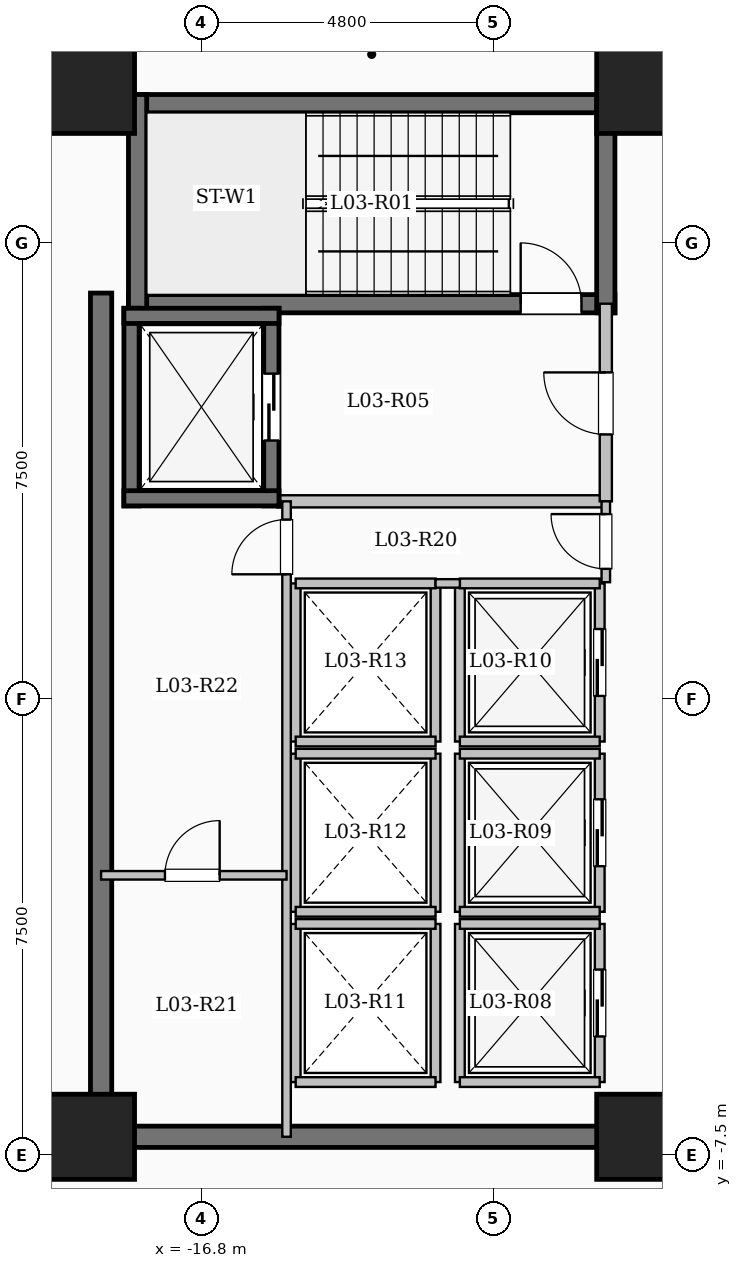
"""IFC4 building model, lengths in metres.
Left out: names, types, materials, properties, quantities, classifications, styles, units other than length and angle.
Written with IfcOpenShell. Run it as: python <this file> out.ifc"""

import sys

from ifc_helpers import new_model, si_unit, direction, frame, frame_2d, origin, origin_2d, place, context, subcontext, project, spatial, rectangle, extrude, element, fill, save


model = new_model("IFC4")
c1 = context("Model", 3, precision=1e-05, world=origin(), true_north=direction((0.0, 1.0)))
c2 = subcontext(c1, "Body", "Model", "MODEL_VIEW")
j1 = project(units=[si_unit("LENGTHUNIT", "METRE"), si_unit("PLANEANGLEUNIT", "RADIAN")], contexts=[c1])
p1 = place(None, origin())
s1 = spatial("IfcSite", under=j1, at=p1, CompositionType="ELEMENT")
p2 = place(p1, origin())
s2 = spatial("IfcBuilding", under=s1, at=p2, CompositionType="ELEMENT")
p3 = place(p2, frame((0.0, 0.0, 14.4)))
s3 = spatial("IfcBuildingStorey", under=s2, at=p3, CompositionType="ELEMENT", Elevation=14.4)
for number, where, z_axis, x_axis in (
    (1, (-9.6, -7.2, 0.0), (0.0, 0.0, 1.0), (1.0, 0.0, 0.0)),
    (2, (-9.6, 10.0, 0.0), (0.0, 0.0, 1.0), (1.0, 0.0, 0.0)),
    (3, (-18.6, -7.2, 0.0), (0.0, 0.0, 1.0), (1.0, 0.0, 0.0)),
    (4, (-18.6, 10.0, 0.0), (0.0, 0.0, 1.0), (1.0, 0.0, 0.0)),
):
    element("IfcColumn", number, at=place(p3, frame(where, z_axis=z_axis, x_axis=x_axis)), inside=s3, PredefinedType="COLUMN", context=c2, shape_type="SweptSolid", body=[
        extrude(rectangle(XDim=1.4, YDim=1.4, at=origin_2d()), origin(), (0.0, 0.0, 1.0), 4.5),
    ])
p4 = place(p3, frame((-18.0, 9.79, 0.0), z_axis=(0.0, 0.0, 1.0), x_axis=(1.0, 0.0, 0.0)))
e5 = element("IfcWall", 5, at=p4, inside=s3, PredefinedType="SHEAR", context=c2, shape_type="SweptSolid", body=[
    extrude(rectangle(XDim=8.0, YDim=0.3, at=frame_2d((4.0, 0.0))), origin(), (0.0, 0.0, 1.0), 4.5),
])
p5 = place(p3, frame((-18.0, 6.5, 0.0), z_axis=(0.0, 0.0, 1.0), x_axis=(1.0, 0.0, 0.0)))
e6 = element("IfcWall", 6, at=p5, inside=s3, PredefinedType="SHEAR", context=c2, shape_type="SweptSolid", body=[
    extrude(rectangle(XDim=8.0, YDim=0.3, at=frame_2d((4.0, 0.0))), origin(), (0.0, 0.0, 1.0), 4.5),
])
p6 = place(p5, frame((6.45, 0.0, 0.0)))
e7 = element("IfcOpeningElement", 7, at=p6, cuts=e6, PredefinedType="OPENING", context=c2, shape_type="SweptSolid", body=[
    extrude(rectangle(XDim=1.0, YDim=2.15, at=frame_2d((0.5, 1.075))), frame((0.0, 0.16, 0.0), z_axis=(0.0, -1.0, 0.0), x_axis=(1.0, 0.0, 0.0)), (0.0, 0.0, 1.0), 0.32),
])
for number, where, z_axis, x_axis in (
    (8, (-17.85, 6.35, 0.0), (0.0, 0.0, 1.0), (0.0, 1.0, 0.0)),
    (9, (-10.15, 6.35, 0.0), (0.0, 0.0, 1.0), (0.0, 1.0, 0.0)),
):
    element("IfcWall", number, at=place(p3, frame(where, z_axis=z_axis, x_axis=x_axis)), inside=s3, PredefinedType="SHEAR", context=c2, shape_type="SweptSolid", body=[
        extrude(rectangle(XDim=3.59, YDim=0.3, at=frame_2d((1.795, 0.0))), origin(), (0.0, 0.0, 1.0), 4.5),
    ])
p7 = place(p3, frame((-15.55, 3.25, 0.0), z_axis=(0.0, 0.0, 1.0), x_axis=(1.0, 0.0, 0.0)))
e10 = element("IfcWall", 10, at=p7, inside=s3, PredefinedType="SOLIDWALL", context=c2, shape_type="SweptSolid", body=[
    extrude(rectangle(XDim=5.4, YDim=0.2, at=frame_2d((2.7, 0.0))), origin(), (0.0, 0.0, 1.0), 4.2),
])
p8 = place(p3, frame((-10.15, 3.25, 0.0), z_axis=(0.0, 0.0, 1.0), x_axis=(0.0, 1.0, 0.0)))
e11 = element("IfcWall", 11, at=p8, inside=s3, PredefinedType="SOLIDWALL", context=c2, shape_type="SweptSolid", body=[
    extrude(rectangle(XDim=3.25, YDim=0.2, at=frame_2d((1.625, 0.0))), origin(), (0.0, 0.0, 1.0), 4.2),
])
p9 = place(p8, frame((1.1, 0.0, 0.0)))
e12 = element("IfcOpeningElement", 12, at=p9, cuts=e11, PredefinedType="OPENING", context=c2, shape_type="SweptSolid", body=[
    extrude(rectangle(XDim=1.02, YDim=2.15, at=frame_2d((0.51, 1.075))), frame((0.0, 0.11, 0.0), z_axis=(0.0, -1.0, 0.0), x_axis=(1.0, 0.0, 0.0)), (0.0, 0.0, 1.0), 0.22),
])
p10 = place(p3, frame((-17.95, 3.175, 0.0), z_axis=(0.0, 0.0, 1.0), x_axis=(0.0, 1.0, 0.0)))
e13 = element("IfcWall", 13, at=p10, inside=s3, PredefinedType="SHEAR", context=c2, shape_type="SweptSolid", body=[
    extrude(rectangle(XDim=3.25, YDim=0.25, at=frame_2d((1.625, 0.0))), origin(), (0.0, 0.0, 1.0), 4.5),
])
p11 = place(p3, frame((-15.65, 3.175, 0.0), z_axis=(0.0, 0.0, 1.0), x_axis=(0.0, 1.0, 0.0)))
e14 = element("IfcWall", 14, at=p11, inside=s3, PredefinedType="SHEAR", context=c2, shape_type="SweptSolid", body=[
    extrude(rectangle(XDim=3.25, YDim=0.25, at=frame_2d((1.625, 0.0))), origin(), (0.0, 0.0, 1.0), 4.5),
])
p12 = place(p11, frame((1.075, 0.0, 0.0)))
e15 = element("IfcOpeningElement", 15, at=p12, cuts=e14, PredefinedType="OPENING", context=c2, shape_type="SweptSolid", body=[
    extrude(rectangle(XDim=1.1, YDim=2.15, at=frame_2d((0.55, 1.075))), frame((0.0, 0.135, 0.0), z_axis=(0.0, -1.0, 0.0), x_axis=(1.0, 0.0, 0.0)), (0.0, 0.0, 1.0), 0.27),
])
for number, where, z_axis, x_axis in (
    (16, (-18.075, 3.3, 0.0), (0.0, 0.0, 1.0), (1.0, 0.0, 0.0)),
    (17, (-18.075, 6.3, 0.0), (0.0, 0.0, 1.0), (1.0, 0.0, 0.0)),
):
    element("IfcWall", number, at=place(p3, frame(where, z_axis=z_axis, x_axis=x_axis)), inside=s3, PredefinedType="SHEAR", context=c2, shape_type="SweptSolid", body=[
        extrude(rectangle(XDim=2.55, YDim=0.25, at=frame_2d((1.275, 0.0))), origin(), (0.0, 0.0, 1.0), 4.5),
    ])
p13 = place(p3, frame((-12.55, -6.3, 0.0), z_axis=(0.0, 0.0, 1.0), x_axis=(0.0, 1.0, 0.0)))
e18 = element("IfcWall", 18, at=p13, inside=s3, PredefinedType="SOLIDWALL", context=c2, shape_type="SweptSolid", body=[
    extrude(rectangle(XDim=2.6, YDim=0.16, at=frame_2d((1.3, 0.0))), origin(), (0.0, 0.0, 1.0), 4.2),
])
p14 = place(p3, frame((-10.25, -6.3, 0.0), z_axis=(0.0, 0.0, 1.0), x_axis=(0.0, 1.0, 0.0)))
e19 = element("IfcWall", 19, at=p14, inside=s3, PredefinedType="SOLIDWALL", context=c2, shape_type="SweptSolid", body=[
    extrude(rectangle(XDim=2.6, YDim=0.16, at=frame_2d((1.3, 0.0))), origin(), (0.0, 0.0, 1.0), 4.2),
])
p15 = place(p14, frame((0.75, 0.0, 0.0)))
e20 = element("IfcOpeningElement", 20, at=p15, cuts=e19, PredefinedType="OPENING", context=c2, shape_type="SweptSolid", body=[
    extrude(rectangle(XDim=1.1, YDim=2.15, at=frame_2d((0.55, 1.075))), frame((0.0, 0.09, 0.0), z_axis=(0.0, -1.0, 0.0), x_axis=(1.0, 0.0, 0.0)), (0.0, 0.0, 1.0), 0.18),
])
for number, where, z_axis, x_axis in (
    (21, (-12.55, -6.3, 0.0), (0.0, 0.0, 1.0), (1.0, 0.0, 0.0)),
    (22, (-12.55, -3.7, 0.0), (0.0, 0.0, 1.0), (1.0, 0.0, 0.0)),
):
    element("IfcWall", number, at=place(p3, frame(where, z_axis=z_axis, x_axis=x_axis)), inside=s3, PredefinedType="SOLIDWALL", context=c2, shape_type="SweptSolid", body=[
        extrude(rectangle(XDim=2.3, YDim=0.16, at=frame_2d((1.15, 0.0))), origin(), (0.0, 0.0, 1.0), 4.2),
    ])
p16 = place(p3, frame((-12.55, -3.5, 0.0), z_axis=(0.0, 0.0, 1.0), x_axis=(0.0, 1.0, 0.0)))
e23 = element("IfcWall", 23, at=p16, inside=s3, PredefinedType="SOLIDWALL", context=c2, shape_type="SweptSolid", body=[
    extrude(rectangle(XDim=2.6, YDim=0.16, at=frame_2d((1.3, 0.0))), origin(), (0.0, 0.0, 1.0), 4.2),
])
p17 = place(p3, frame((-10.25, -3.5, 0.0), z_axis=(0.0, 0.0, 1.0), x_axis=(0.0, 1.0, 0.0)))
e24 = element("IfcWall", 24, at=p17, inside=s3, PredefinedType="SOLIDWALL", context=c2, shape_type="SweptSolid", body=[
    extrude(rectangle(XDim=2.6, YDim=0.16, at=frame_2d((1.3, 0.0))), origin(), (0.0, 0.0, 1.0), 4.2),
])
p18 = place(p17, frame((0.75, 0.0, 0.0)))
e25 = element("IfcOpeningElement", 25, at=p18, cuts=e24, PredefinedType="OPENING", context=c2, shape_type="SweptSolid", body=[
    extrude(rectangle(XDim=1.1, YDim=2.15, at=frame_2d((0.55, 1.075))), frame((0.0, 0.09, 0.0), z_axis=(0.0, -1.0, 0.0), x_axis=(1.0, 0.0, 0.0)), (0.0, 0.0, 1.0), 0.18),
])
for number, where, z_axis, x_axis in (
    (26, (-12.55, -3.5, 0.0), (0.0, 0.0, 1.0), (1.0, 0.0, 0.0)),
    (27, (-12.55, -0.9, 0.0), (0.0, 0.0, 1.0), (1.0, 0.0, 0.0)),
):
    element("IfcWall", number, at=place(p3, frame(where, z_axis=z_axis, x_axis=x_axis)), inside=s3, PredefinedType="SOLIDWALL", context=c2, shape_type="SweptSolid", body=[
        extrude(rectangle(XDim=2.3, YDim=0.16, at=frame_2d((1.15, 0.0))), origin(), (0.0, 0.0, 1.0), 4.2),
    ])
p19 = place(p3, frame((-12.55, -0.7, 0.0), z_axis=(0.0, 0.0, 1.0), x_axis=(0.0, 1.0, 0.0)))
e28 = element("IfcWall", 28, at=p19, inside=s3, PredefinedType="SOLIDWALL", context=c2, shape_type="SweptSolid", body=[
    extrude(rectangle(XDim=2.6, YDim=0.16, at=frame_2d((1.3, 0.0))), origin(), (0.0, 0.0, 1.0), 4.2),
])
p20 = place(p3, frame((-10.25, -0.7, 0.0), z_axis=(0.0, 0.0, 1.0), x_axis=(0.0, 1.0, 0.0)))
e29 = element("IfcWall", 29, at=p20, inside=s3, PredefinedType="SOLIDWALL", context=c2, shape_type="SweptSolid", body=[
    extrude(rectangle(XDim=2.6, YDim=0.16, at=frame_2d((1.3, 0.0))), origin(), (0.0, 0.0, 1.0), 4.2),
])
p21 = place(p20, frame((0.75, 0.0, 0.0)))
e30 = element("IfcOpeningElement", 30, at=p21, cuts=e29, PredefinedType="OPENING", context=c2, shape_type="SweptSolid", body=[
    extrude(rectangle(XDim=1.1, YDim=2.15, at=frame_2d((0.55, 1.075))), frame((0.0, 0.09, 0.0), z_axis=(0.0, -1.0, 0.0), x_axis=(1.0, 0.0, 0.0)), (0.0, 0.0, 1.0), 0.18),
])
for number, where, z_axis, x_axis in (
    (31, (-12.55, -0.7, 0.0), (0.0, 0.0, 1.0), (1.0, 0.0, 0.0)),
    (32, (-12.55, 1.9, 0.0), (0.0, 0.0, 1.0), (1.0, 0.0, 0.0)),
):
    element("IfcWall", number, at=place(p3, frame(where, z_axis=z_axis, x_axis=x_axis)), inside=s3, PredefinedType="SOLIDWALL", context=c2, shape_type="SweptSolid", body=[
        extrude(rectangle(XDim=2.3, YDim=0.16, at=frame_2d((1.15, 0.0))), origin(), (0.0, 0.0, 1.0), 4.2),
    ])
for number, where, z_axis, x_axis in (
    (33, (-15.25, -6.3, 0.0), (0.0, 0.0, 1.0), (0.0, 1.0, 0.0)),
    (34, (-12.95, -6.3, 0.0), (0.0, 0.0, 1.0), (0.0, 1.0, 0.0)),
):
    element("IfcWall", number, at=place(p3, frame(where, z_axis=z_axis, x_axis=x_axis)), inside=s3, PredefinedType="SOLIDWALL", context=c2, shape_type="SweptSolid", body=[
        extrude(rectangle(XDim=2.6, YDim=0.16, at=frame_2d((1.3, 0.0))), origin(), (0.0, 0.0, 1.0), 4.2),
    ])
for number, where, z_axis, x_axis in (
    (35, (-15.25, -6.3, 0.0), (0.0, 0.0, 1.0), (1.0, 0.0, 0.0)),
    (36, (-15.25, -3.7, 0.0), (0.0, 0.0, 1.0), (1.0, 0.0, 0.0)),
):
    element("IfcWall", number, at=place(p3, frame(where, z_axis=z_axis, x_axis=x_axis)), inside=s3, PredefinedType="SOLIDWALL", context=c2, shape_type="SweptSolid", body=[
        extrude(rectangle(XDim=2.3, YDim=0.16, at=frame_2d((1.15, 0.0))), origin(), (0.0, 0.0, 1.0), 4.2),
    ])
for number, where, z_axis, x_axis in (
    (37, (-15.25, -3.5, 0.0), (0.0, 0.0, 1.0), (0.0, 1.0, 0.0)),
    (38, (-12.95, -3.5, 0.0), (0.0, 0.0, 1.0), (0.0, 1.0, 0.0)),
):
    element("IfcWall", number, at=place(p3, frame(where, z_axis=z_axis, x_axis=x_axis)), inside=s3, PredefinedType="SOLIDWALL", context=c2, shape_type="SweptSolid", body=[
        extrude(rectangle(XDim=2.6, YDim=0.16, at=frame_2d((1.3, 0.0))), origin(), (0.0, 0.0, 1.0), 4.2),
    ])
for number, where, z_axis, x_axis in (
    (39, (-15.25, -3.5, 0.0), (0.0, 0.0, 1.0), (1.0, 0.0, 0.0)),
    (40, (-15.25, -0.9, 0.0), (0.0, 0.0, 1.0), (1.0, 0.0, 0.0)),
):
    element("IfcWall", number, at=place(p3, frame(where, z_axis=z_axis, x_axis=x_axis)), inside=s3, PredefinedType="SOLIDWALL", context=c2, shape_type="SweptSolid", body=[
        extrude(rectangle(XDim=2.3, YDim=0.16, at=frame_2d((1.15, 0.0))), origin(), (0.0, 0.0, 1.0), 4.2),
    ])
for number, where, z_axis, x_axis in (
    (41, (-15.25, -0.7, 0.0), (0.0, 0.0, 1.0), (0.0, 1.0, 0.0)),
    (42, (-12.95, -0.7, 0.0), (0.0, 0.0, 1.0), (0.0, 1.0, 0.0)),
):
    element("IfcWall", number, at=place(p3, frame(where, z_axis=z_axis, x_axis=x_axis)), inside=s3, PredefinedType="SOLIDWALL", context=c2, shape_type="SweptSolid", body=[
        extrude(rectangle(XDim=2.6, YDim=0.16, at=frame_2d((1.3, 0.0))), origin(), (0.0, 0.0, 1.0), 4.2),
    ])
for number, where, z_axis, x_axis in (
    (43, (-15.25, -0.7, 0.0), (0.0, 0.0, 1.0), (1.0, 0.0, 0.0)),
    (44, (-15.25, 1.9, 0.0), (0.0, 0.0, 1.0), (1.0, 0.0, 0.0)),
):
    element("IfcWall", number, at=place(p3, frame(where, z_axis=z_axis, x_axis=x_axis)), inside=s3, PredefinedType="SOLIDWALL", context=c2, shape_type="SweptSolid", body=[
        extrude(rectangle(XDim=2.3, YDim=0.16, at=frame_2d((1.15, 0.0))), origin(), (0.0, 0.0, 1.0), 4.2),
    ])
p22 = place(p3, frame((-18.45, -7.375, 0.0), z_axis=(0.0, 0.0, 1.0), x_axis=(0.0, 1.0, 0.0)))
e45 = element("IfcWall", 45, at=p22, inside=s3, PredefinedType="SHEAR", context=c2, shape_type="SweptSolid", body=[
    extrude(rectangle(XDim=14.05, YDim=0.35, at=frame_2d((7.025, 0.0))), origin(), (0.0, 0.0, 1.0), 4.5),
])
p23 = place(p3, frame((-18.625, -7.2, 0.0), z_axis=(0.0, 0.0, 1.0), x_axis=(1.0, 0.0, 0.0)))
e46 = element("IfcWall", 46, at=p23, inside=s3, PredefinedType="SHEAR", context=c2, shape_type="SweptSolid", body=[
    extrude(rectangle(XDim=8.55, YDim=0.35, at=frame_2d((4.275, 0.0))), origin(), (0.0, 0.0, 1.0), 4.5),
])
p24 = place(p3, frame((-12.95, 1.9, 0.0), z_axis=(0.0, 0.0, 1.0), x_axis=(1.0, 0.0, 0.0)))
e47 = element("IfcWall", 47, at=p24, inside=s3, PredefinedType="PARTITIONING", context=c2, shape_type="SweptSolid", body=[
    extrude(rectangle(XDim=0.4, YDim=0.14, at=frame_2d((0.2, 0.0))), origin(), (0.0, 0.0, 1.0), 4.2),
])
p25 = place(p3, frame((-10.15, 1.92, 0.0), z_axis=(0.0, 0.0, 1.0), x_axis=(0.0, 1.0, 0.0)))
e48 = element("IfcWall", 48, at=p25, inside=s3, PredefinedType="PARTITIONING", context=c2, shape_type="SweptSolid", body=[
    extrude(rectangle(XDim=1.33, YDim=0.14, at=frame_2d((0.665, 0.0))), origin(), (0.0, 0.0, 1.0), 4.2),
])
p26 = place(p25, frame((0.22, 0.0, 0.0)))
e49 = element("IfcOpeningElement", 49, at=p26, cuts=e48, PredefinedType="OPENING", context=c2, shape_type="SweptSolid", body=[
    extrude(rectangle(XDim=0.9, YDim=2.08, at=frame_2d((0.45, 1.04))), frame((0.0, 0.08, 0.0), z_axis=(0.0, -1.0, 0.0), x_axis=(1.0, 0.0, 0.0)), (0.0, 0.0, 1.0), 0.16),
])
p27 = place(p3, frame((-15.4, -7.2, 0.0), z_axis=(0.0, 0.0, 1.0), x_axis=(0.0, 1.0, 0.0)))
e50 = element("IfcWall", 50, at=p27, inside=s3, PredefinedType="PARTITIONING", context=c2, shape_type="SweptSolid", body=[
    extrude(rectangle(XDim=10.45, YDim=0.14, at=frame_2d((5.225, 0.0))), origin(), (0.0, 0.0, 1.0), 4.2),
])
p28 = place(p27, frame((9.25, 0.0, 0.0)))
e51 = element("IfcOpeningElement", 51, at=p28, cuts=e50, PredefinedType="OPENING", context=c2, shape_type="SweptSolid", body=[
    extrude(rectangle(XDim=0.9, YDim=2.08, at=frame_2d((0.45, 1.04))), frame((0.0, 0.08, 0.0), z_axis=(0.0, -1.0, 0.0), x_axis=(1.0, 0.0, 0.0)), (0.0, 0.0, 1.0), 0.16),
])
p29 = place(p3, frame((-18.45, -2.9, 0.0), z_axis=(0.0, 0.0, 1.0), x_axis=(1.0, 0.0, 0.0)))
e52 = element("IfcWall", 52, at=p29, inside=s3, PredefinedType="PARTITIONING", context=c2, shape_type="SweptSolid", body=[
    extrude(rectangle(XDim=3.05, YDim=0.14, at=frame_2d((1.525, 0.0))), origin(), (0.0, 0.0, 1.0), 4.2),
])
p30 = place(p29, frame((1.05, 0.0, 0.0)))
e53 = element("IfcOpeningElement", 53, at=p30, cuts=e52, PredefinedType="OPENING", context=c2, shape_type="SweptSolid", body=[
    extrude(rectangle(XDim=0.9, YDim=2.08, at=frame_2d((0.45, 1.04))), frame((0.0, 0.08, 0.0), z_axis=(0.0, -1.0, 0.0), x_axis=(1.0, 0.0, 0.0)), (0.0, 0.0, 1.0), 0.16),
])
p31 = place(p3, frame((-28.88, -7.25, 0.0), z_axis=(0.0, 0.0, 1.0), x_axis=(1.0, 0.0, 0.0)))
e54 = element("IfcWall", 54, at=p31, inside=s3, PredefinedType="PARTITIONING", context=c2, shape_type="SweptSolid", body=[
    extrude(rectangle(XDim=10.43, YDim=0.15, at=frame_2d((5.215, 0.0))), origin(), (0.0, 0.0, 1.0), 4.2),
])
p32 = place(p31, frame((2.5, 0.0, 0.0)))
e55 = element("IfcOpeningElement", 55, at=p32, cuts=e54, PredefinedType="OPENING", context=c2, shape_type="SweptSolid", body=[
    extrude(rectangle(XDim=1.08, YDim=2.15, at=frame_2d((0.54, 1.075))), frame((0.0, 0.085, 0.0), z_axis=(0.0, -1.0, 0.0), x_axis=(1.0, 0.0, 0.0)), (0.0, 0.0, 1.0), 0.17),
])
p33 = place(p6, origin())
e56 = element("IfcDoor", 56, at=p33, inside=s3, OperationType="SINGLE_SWING_LEFT", PredefinedType="DOOR", context=c2, shape_type="SweptSolid", body=[
    extrude(rectangle(XDim=1.0, YDim=2.15, at=frame_2d((0.5, 1.075))), frame((0.0, 0.025, 0.0), z_axis=(0.0, -1.0, 0.0), x_axis=(1.0, 0.0, 0.0)), (0.0, 0.0, 1.0), 0.05),
])
fill(e7, e56)
p34 = place(p9, origin())
e57 = element("IfcDoor", 57, at=p34, inside=s3, OperationType="SINGLE_SWING_RIGHT", PredefinedType="DOOR", context=c2, shape_type="SweptSolid", body=[
    extrude(rectangle(XDim=1.02, YDim=2.15, at=frame_2d((0.51, 1.075))), frame((0.0, 0.025, 0.0), z_axis=(0.0, -1.0, 0.0), x_axis=(1.0, 0.0, 0.0)), (0.0, 0.0, 1.0), 0.05),
])
fill(e12, e57)
p35 = place(p12, origin())
e58 = element("IfcDoor", 58, at=p35, inside=s3, OperationType="SLIDING_TO_LEFT", PredefinedType="DOOR", context=c2, shape_type="SweptSolid", body=[
    extrude(rectangle(XDim=1.1, YDim=2.15, at=frame_2d((0.55, 1.075))), frame((0.0, 0.025, 0.0), z_axis=(0.0, -1.0, 0.0), x_axis=(1.0, 0.0, 0.0)), (0.0, 0.0, 1.0), 0.05),
])
fill(e15, e58)
p36 = place(p15, origin())
e59 = element("IfcDoor", 59, at=p36, inside=s3, OperationType="SLIDING_TO_LEFT", PredefinedType="DOOR", context=c2, shape_type="SweptSolid", body=[
    extrude(rectangle(XDim=1.1, YDim=2.15, at=frame_2d((0.55, 1.075))), frame((0.0, 0.025, 0.0), z_axis=(0.0, -1.0, 0.0), x_axis=(1.0, 0.0, 0.0)), (0.0, 0.0, 1.0), 0.05),
])
fill(e20, e59)
p37 = place(p18, origin())
e60 = element("IfcDoor", 60, at=p37, inside=s3, OperationType="SLIDING_TO_LEFT", PredefinedType="DOOR", context=c2, shape_type="SweptSolid", body=[
    extrude(rectangle(XDim=1.1, YDim=2.15, at=frame_2d((0.55, 1.075))), frame((0.0, 0.025, 0.0), z_axis=(0.0, -1.0, 0.0), x_axis=(1.0, 0.0, 0.0)), (0.0, 0.0, 1.0), 0.05),
])
fill(e25, e60)
p38 = place(p21, origin())
e61 = element("IfcDoor", 61, at=p38, inside=s3, OperationType="SLIDING_TO_LEFT", PredefinedType="DOOR", context=c2, shape_type="SweptSolid", body=[
    extrude(rectangle(XDim=1.1, YDim=2.15, at=frame_2d((0.55, 1.075))), frame((0.0, 0.025, 0.0), z_axis=(0.0, -1.0, 0.0), x_axis=(1.0, 0.0, 0.0)), (0.0, 0.0, 1.0), 0.05),
])
fill(e30, e61)
p39 = place(p26, origin())
e62 = element("IfcDoor", 62, at=p39, inside=s3, OperationType="SINGLE_SWING_RIGHT", PredefinedType="DOOR", context=c2, shape_type="SweptSolid", body=[
    extrude(rectangle(XDim=0.9, YDim=2.08, at=frame_2d((0.45, 1.04))), frame((0.0, 0.025, 0.0), z_axis=(0.0, -1.0, 0.0), x_axis=(1.0, 0.0, 0.0)), (0.0, 0.0, 1.0), 0.05),
])
fill(e49, e62)
p40 = place(p28, origin())
e63 = element("IfcDoor", 63, at=p40, inside=s3, OperationType="SINGLE_SWING_LEFT", PredefinedType="DOOR", context=c2, shape_type="SweptSolid", body=[
    extrude(rectangle(XDim=0.9, YDim=2.08, at=frame_2d((0.45, 1.04))), frame((0.0, 0.025, 0.0), z_axis=(0.0, -1.0, 0.0), x_axis=(1.0, 0.0, 0.0)), (0.0, 0.0, 1.0), 0.05),
])
fill(e51, e63)
p41 = place(p30, origin())
e64 = element("IfcDoor", 64, at=p41, inside=s3, OperationType="SINGLE_SWING_RIGHT", PredefinedType="DOOR", context=c2, shape_type="SweptSolid", body=[
    extrude(rectangle(XDim=0.9, YDim=2.08, at=frame_2d((0.45, 1.04))), frame((0.0, 0.025, 0.0), z_axis=(0.0, -1.0, 0.0), x_axis=(1.0, 0.0, 0.0)), (0.0, 0.0, 1.0), 0.05),
])
fill(e53, e64)
save(model, sys.argv[1])
